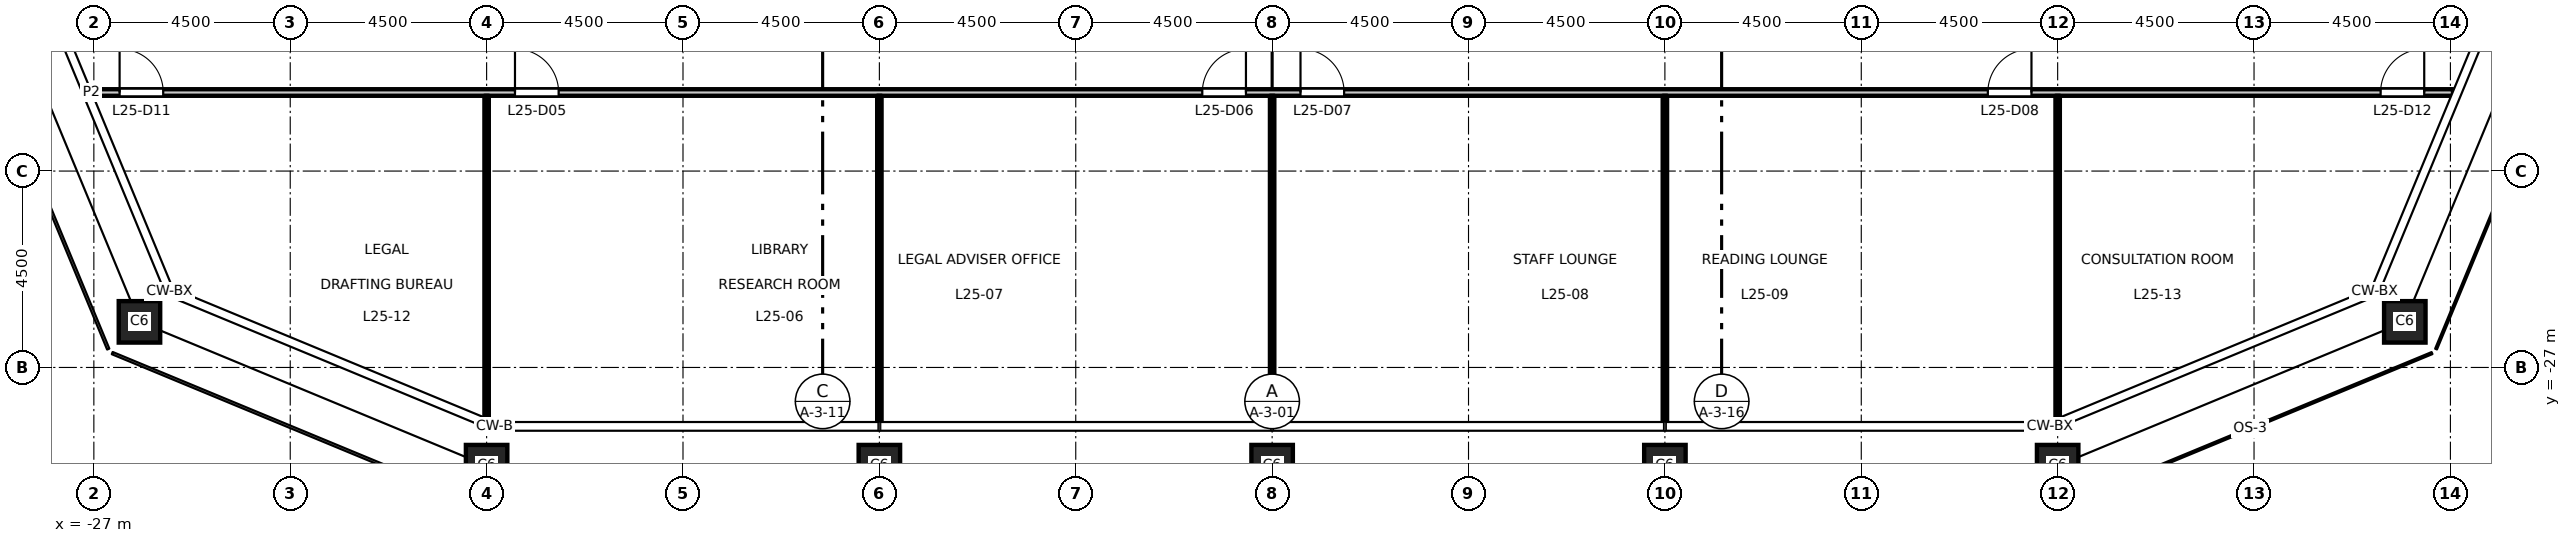
"""IFC4 building model, lengths in metres.
Left out: names, types, materials, properties, quantities, classifications, styles, units other than length and angle.
Written with IfcOpenShell. Run it as: python <this file> out.ifc"""

import sys

from ifc_helpers import new_model, si_unit, direction, frame, frame_2d, origin, origin_2d, place, context, subcontext, project, spatial, rectangle, hollow_rectangle, extrude, element, fill, save


model = new_model("IFC4")
c1 = context("Model", 3, precision=1e-05, world=origin(), true_north=direction((0.0, 1.0)))
c2 = subcontext(c1, "Body", "Model", "MODEL_VIEW")
j1 = project(units=[si_unit("LENGTHUNIT", "METRE"), si_unit("PLANEANGLEUNIT", "RADIAN")], contexts=[c1])
p1 = place(None, origin())
s1 = spatial("IfcSite", under=j1, at=p1, CompositionType="ELEMENT")
p2 = place(p1, origin())
s2 = spatial("IfcBuilding", under=s1, at=p2, CompositionType="ELEMENT")
p3 = place(p2, frame((0.0, 0.0, 118.2)))
s3 = spatial("IfcBuildingStorey", under=s2, at=p3, CompositionType="ELEMENT", Elevation=118.2)
for number, where, z_axis, x_axis in (
    (1, (-18.0, -29.25, 0.0), (0.0, 0.0, 1.0), (1.0, 0.0, 0.0)),
    (2, (-9.0, -29.25, 0.0), (0.0, 0.0, 1.0), (1.0, 0.0, 0.0)),
    (3, (0.0, -29.25, 0.0), (0.0, 0.0, 1.0), (1.0, 0.0, 0.0)),
    (4, (9.0, -29.25, 0.0), (0.0, 0.0, 1.0), (1.0, 0.0, 0.0)),
    (5, (18.0, -29.25, 0.0), (0.0, 0.0, 1.0), (1.0, 0.0, 0.0)),
    (6, (25.955, -25.955, 0.0), (0.0, 0.0, 1.0), (1.0, 0.0, 0.0)),
    (7, (-25.955, -25.955, 0.0), (0.0, 0.0, 1.0), (1.0, 0.0, 0.0)),
):
    element("IfcColumn", number, at=place(p3, frame(where, z_axis=z_axis, x_axis=x_axis)), inside=s3, PredefinedType="COLUMN", context=c2, shape_type="SweptSolid", body=[
        extrude(hollow_rectangle(XDim=0.95, YDim=0.95, WallThickness=0.055, at=origin_2d()), origin(), (0.0, 0.0, 1.0), 4.5),
    ])
p4 = place(p3, frame((-27.06, -20.7, 0.0), z_axis=(0.0, 0.0, 1.0), x_axis=(1.0, 0.0, 0.0)))
e8 = element("IfcWall", 8, at=p4, inside=s3, PredefinedType="PARTITIONING", context=c2, shape_type="SweptSolid", body=[
    extrude(rectangle(XDim=54.12, YDim=0.15, at=frame_2d((27.06, 0.0))), origin(), (0.0, 0.0, 1.0), 4.35),
])
p5 = place(p4, frame((9.71, 0.0, 0.0)))
e9 = element("IfcOpeningElement", 9, at=p5, cuts=e8, PredefinedType="OPENING", context=c2, shape_type="SweptSolid", body=[
    extrude(rectangle(XDim=1.0, YDim=2.1, at=frame_2d((0.5, 1.05))), frame((0.0, 0.085, 0.0), z_axis=(0.0, -1.0, 0.0), x_axis=(1.0, 0.0, 0.0)), (0.0, 0.0, 1.0), 0.17),
])
p6 = place(p4, frame((25.46, 0.0, 0.0)))
e10 = element("IfcOpeningElement", 10, at=p6, cuts=e8, PredefinedType="OPENING", context=c2, shape_type="SweptSolid", body=[
    extrude(rectangle(XDim=1.0, YDim=2.1, at=frame_2d((0.5, 1.05))), frame((0.0, 0.085, 0.0), z_axis=(0.0, -1.0, 0.0), x_axis=(1.0, 0.0, 0.0)), (0.0, 0.0, 1.0), 0.17),
])
p7 = place(p4, frame((27.71, 0.0, 0.0)))
e11 = element("IfcOpeningElement", 11, at=p7, cuts=e8, PredefinedType="OPENING", context=c2, shape_type="SweptSolid", body=[
    extrude(rectangle(XDim=1.0, YDim=2.1, at=frame_2d((0.5, 1.05))), frame((0.0, 0.085, 0.0), z_axis=(0.0, -1.0, 0.0), x_axis=(1.0, 0.0, 0.0)), (0.0, 0.0, 1.0), 0.17),
])
p8 = place(p4, frame((43.46, 0.0, 0.0)))
e12 = element("IfcOpeningElement", 12, at=p8, cuts=e8, PredefinedType="OPENING", context=c2, shape_type="SweptSolid", body=[
    extrude(rectangle(XDim=1.0, YDim=2.1, at=frame_2d((0.5, 1.05))), frame((0.0, 0.085, 0.0), z_axis=(0.0, -1.0, 0.0), x_axis=(1.0, 0.0, 0.0)), (0.0, 0.0, 1.0), 0.17),
])
p9 = place(p4, frame((0.65, 0.0, 0.0)))
e13 = element("IfcOpeningElement", 13, at=p9, cuts=e8, PredefinedType="OPENING", context=c2, shape_type="SweptSolid", body=[
    extrude(rectangle(XDim=1.0, YDim=2.1, at=frame_2d((0.5, 1.05))), frame((0.0, 0.085, 0.0), z_axis=(0.0, -1.0, 0.0), x_axis=(1.0, 0.0, 0.0)), (0.0, 0.0, 1.0), 0.17),
])
p10 = place(p4, frame((52.46, 0.0, 0.0)))
e14 = element("IfcOpeningElement", 14, at=p10, cuts=e8, PredefinedType="OPENING", context=c2, shape_type="SweptSolid", body=[
    extrude(rectangle(XDim=1.0, YDim=2.1, at=frame_2d((0.5, 1.05))), frame((0.0, 0.085, 0.0), z_axis=(0.0, -1.0, 0.0), x_axis=(1.0, 0.0, 0.0)), (0.0, 0.0, 1.0), 0.17),
])
p11 = place(p3, frame((-18.0, -28.178, 0.0), z_axis=(0.0, 0.0, 1.0), x_axis=(0.0, 1.0, 0.0)))
e15 = element("IfcWall", 15, at=p11, inside=s3, PredefinedType="PARTITIONING", context=c2, shape_type="SweptSolid", body=[
    extrude(rectangle(XDim=7.403, YDim=0.1, at=frame_2d((3.702, 0.0))), origin(), (0.0, 0.0, 1.0), 3.45),
])
for number, where, z_axis, x_axis in (
    (16, (-9.0, -28.26, 0.0), (0.0, 0.0, 1.0), (0.0, 1.0, 0.0)),
    (17, (0.0, -28.26, 0.0), (0.0, 0.0, 1.0), (0.0, 1.0, 0.0)),
    (18, (9.0, -28.26, 0.0), (0.0, 0.0, 1.0), (0.0, 1.0, 0.0)),
):
    element("IfcWall", number, at=place(p3, frame(where, z_axis=z_axis, x_axis=x_axis)), inside=s3, PredefinedType="PARTITIONING", context=c2, shape_type="SweptSolid", body=[
        extrude(rectangle(XDim=7.485, YDim=0.1, at=frame_2d((3.743, 0.0))), origin(), (0.0, 0.0, 1.0), 3.45),
    ])
p12 = place(p3, frame((18.0, -28.178, 0.0), z_axis=(0.0, 0.0, 1.0), x_axis=(0.0, 1.0, 0.0)))
e19 = element("IfcWall", 19, at=p12, inside=s3, PredefinedType="PARTITIONING", context=c2, shape_type="SweptSolid", body=[
    extrude(rectangle(XDim=7.403, YDim=0.1, at=frame_2d((3.702, 0.0))), origin(), (0.0, 0.0, 1.0), 3.45),
])
p13 = place(p5, origin())
e20 = element("IfcDoor", 20, at=p13, inside=s3, OperationType="SINGLE_SWING_LEFT", PredefinedType="DOOR", context=c2, shape_type="SweptSolid", body=[
    extrude(rectangle(XDim=1.0, YDim=2.1, at=frame_2d((0.5, 1.05))), frame((0.0, 0.025, 0.0), z_axis=(0.0, -1.0, 0.0), x_axis=(1.0, 0.0, 0.0)), (0.0, 0.0, 1.0), 0.05),
])
fill(e9, e20)
p14 = place(p6, origin())
e21 = element("IfcDoor", 21, at=p14, inside=s3, OperationType="SINGLE_SWING_RIGHT", PredefinedType="DOOR", context=c2, shape_type="SweptSolid", body=[
    extrude(rectangle(XDim=1.0, YDim=2.1, at=frame_2d((0.5, 1.05))), frame((0.0, 0.025, 0.0), z_axis=(0.0, -1.0, 0.0), x_axis=(1.0, 0.0, 0.0)), (0.0, 0.0, 1.0), 0.05),
])
fill(e10, e21)
p15 = place(p7, origin())
e22 = element("IfcDoor", 22, at=p15, inside=s3, OperationType="SINGLE_SWING_LEFT", PredefinedType="DOOR", context=c2, shape_type="SweptSolid", body=[
    extrude(rectangle(XDim=1.0, YDim=2.1, at=frame_2d((0.5, 1.05))), frame((0.0, 0.025, 0.0), z_axis=(0.0, -1.0, 0.0), x_axis=(1.0, 0.0, 0.0)), (0.0, 0.0, 1.0), 0.05),
])
fill(e11, e22)
p16 = place(p8, origin())
e23 = element("IfcDoor", 23, at=p16, inside=s3, OperationType="SINGLE_SWING_RIGHT", PredefinedType="DOOR", context=c2, shape_type="SweptSolid", body=[
    extrude(rectangle(XDim=1.0, YDim=2.1, at=frame_2d((0.5, 1.05))), frame((0.0, 0.025, 0.0), z_axis=(0.0, -1.0, 0.0), x_axis=(1.0, 0.0, 0.0)), (0.0, 0.0, 1.0), 0.05),
])
fill(e12, e23)
p17 = place(p9, origin())
e24 = element("IfcDoor", 24, at=p17, inside=s3, OperationType="SINGLE_SWING_LEFT", PredefinedType="DOOR", context=c2, shape_type="SweptSolid", body=[
    extrude(rectangle(XDim=1.0, YDim=2.1, at=frame_2d((0.5, 1.05))), frame((0.0, 0.025, 0.0), z_axis=(0.0, -1.0, 0.0), x_axis=(1.0, 0.0, 0.0)), (0.0, 0.0, 1.0), 0.05),
])
fill(e13, e24)
p18 = place(p10, origin())
e25 = element("IfcDoor", 25, at=p18, inside=s3, OperationType="SINGLE_SWING_RIGHT", PredefinedType="DOOR", context=c2, shape_type="SweptSolid", body=[
    extrude(rectangle(XDim=1.0, YDim=2.1, at=frame_2d((0.5, 1.05))), frame((0.0, 0.025, 0.0), z_axis=(0.0, -1.0, 0.0), x_axis=(1.0, 0.0, 0.0)), (0.0, 0.0, 1.0), 0.05),
])
fill(e14, e25)
save(model, sys.argv[1])
